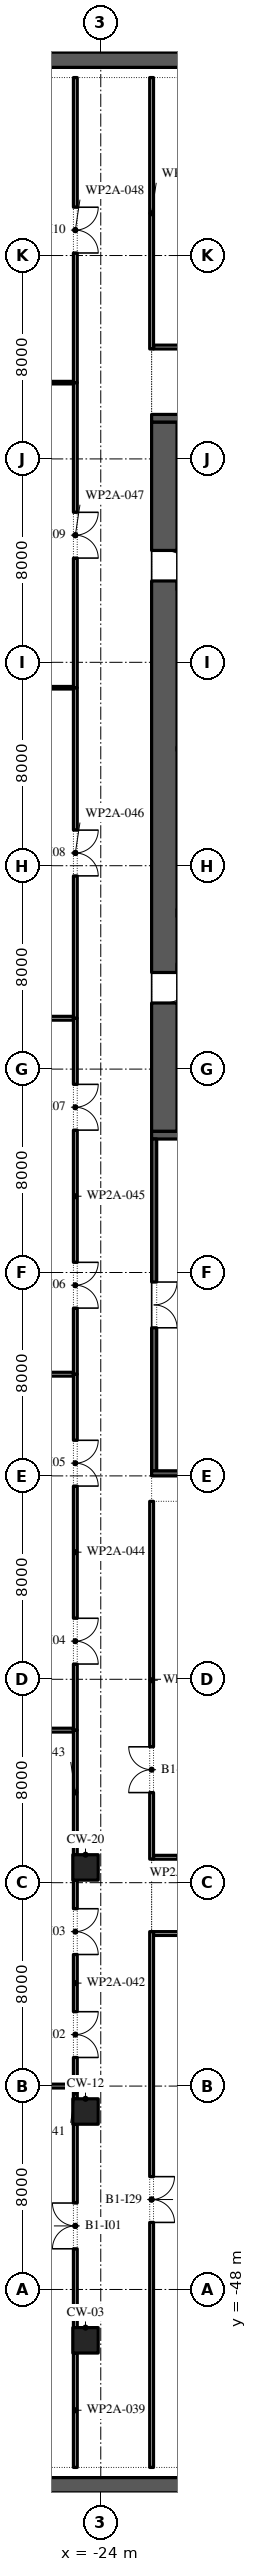
"""IFC4 building model, lengths in metres.
Left out: names, types, materials, properties, quantities, classifications, styles, units other than length and angle.
Written with IfcOpenShell. Run it as: python <this file> out.ifc"""

import sys

from ifc_helpers import new_model, si_unit, direction, frame, frame_2d, origin, origin_2d, place, context, subcontext, project, spatial, rectangle, extrude, element, fill, save


model = new_model("IFC4")
c1 = context("Model", 3, precision=1e-05, world=origin(), true_north=direction((0.0, 1.0)))
c2 = subcontext(c1, "Body", "Model", "MODEL_VIEW")
j1 = project(units=[si_unit("LENGTHUNIT", "METRE"), si_unit("PLANEANGLEUNIT", "RADIAN")], contexts=[c1])
p1 = place(None, origin())
s1 = spatial("IfcSite", under=j1, at=p1, CompositionType="ELEMENT")
p2 = place(p1, origin())
s2 = spatial("IfcBuilding", under=s1, at=p2, CompositionType="ELEMENT")
p3 = place(p2, frame((0.0, 0.0, -5.2)))
s3 = spatial("IfcBuildingStorey", under=s2, at=p3, CompositionType="ELEMENT", Elevation=-5.2)
for number, where, z_axis, x_axis in (
    (1, (-48.0, -55.7, 0.0), (0.0, 0.0, 1.0), (1.0, 0.0, 0.0)),
    (2, (-48.0, 39.7, 0.0), (0.0, 0.0, 1.0), (1.0, 0.0, 0.0)),
):
    element("IfcWall", number, at=place(p3, frame(where, z_axis=z_axis, x_axis=x_axis)), inside=s3, PredefinedType="SOLIDWALL", context=c2, shape_type="SweptSolid", body=[
        extrude(rectangle(XDim=96.0, YDim=0.6, at=frame_2d((48.0, 0.0))), origin(), (0.0, 0.0, 1.0), 4.8),
    ])
for number, where, z_axis, x_axis in (
    (3, (-24.6, -50.0, 0.0), (0.0, 0.0, 1.0), (1.0, 0.0, 0.0)),
    (4, (-24.6, -41.0, 0.0), (0.0, 0.0, 1.0), (1.0, 0.0, 0.0)),
    (5, (-24.6, -31.4, 0.0), (0.0, 0.0, 1.0), (1.0, 0.0, 0.0)),
):
    element("IfcColumn", number, at=place(p3, frame(where, z_axis=z_axis, x_axis=x_axis)), inside=s3, PredefinedType="COLUMN", context=c2, shape_type="SweptSolid", body=[
        extrude(rectangle(XDim=1.0, YDim=1.0, at=origin_2d()), origin(), (0.0, 0.0, 1.0), 5.2),
    ])
p4 = place(p3, frame((-21.5, -2.45, 0.0), z_axis=(0.0, 0.0, 1.0), x_axis=(0.0, 1.0, 0.0)))
e6 = element("IfcWall", 6, at=p4, inside=s3, PredefinedType="SHEAR", context=c2, shape_type="SweptSolid", body=[
    extrude(rectangle(XDim=27.9, YDim=1.0, at=frame_2d((13.95, 0.0))), origin(), (0.0, 0.0, 1.0), 4.9),
])
p5 = place(p4, frame((5.05, 0.0, 0.0)))
e7 = element("IfcOpeningElement", 7, at=p5, cuts=e6, PredefinedType="OPENING", context=c2, shape_type="SweptSolid", body=[
    extrude(rectangle(XDim=1.2, YDim=2.1, at=frame_2d((0.6, 1.05))), frame((0.0, 0.51, 0.0), z_axis=(0.0, -1.0, 0.0), x_axis=(1.0, 0.0, 0.0)), (0.0, 0.0, 1.0), 1.02),
])
p6 = place(p4, frame((21.65, 0.0, 0.0)))
e8 = element("IfcOpeningElement", 8, at=p6, cuts=e6, PredefinedType="OPENING", context=c2, shape_type="SweptSolid", body=[
    extrude(rectangle(XDim=1.2, YDim=2.1, at=frame_2d((0.6, 1.05))), frame((0.0, 0.51, 0.0), z_axis=(0.0, -1.0, 0.0), x_axis=(1.0, 0.0, 0.0)), (0.0, 0.0, 1.0), 1.02),
])
for number, where, z_axis, x_axis in (
    (9, (-22.0, -2.6, 0.0), (0.0, 0.0, 1.0), (1.0, 0.0, 0.0)),
    (10, (-22.0, 25.6, 0.0), (0.0, 0.0, 1.0), (1.0, 0.0, 0.0)),
):
    element("IfcWall", number, at=place(p3, frame(where, z_axis=z_axis, x_axis=x_axis)), inside=s3, PredefinedType="SHEAR", context=c2, shape_type="SweptSolid", body=[
        extrude(rectangle(XDim=12.0, YDim=0.3, at=frame_2d((6.0, 0.0))), origin(), (0.0, 0.0, 1.0), 4.9),
    ])
p7 = place(p3, frame((-21.9, -15.8, 0.0), z_axis=(0.0, 0.0, 1.0), x_axis=(0.0, 1.0, 0.0)))
e11 = element("IfcWall", 11, at=p7, inside=s3, PredefinedType="SHEAR", context=c2, shape_type="SweptSolid", body=[
    extrude(rectangle(XDim=13.05, YDim=0.2, at=frame_2d((6.525, 0.0))), origin(), (0.0, 0.0, 1.0), 4.9),
])
p8 = place(p7, frame((5.625, 0.0, 0.0)))
e12 = element("IfcOpeningElement", 12, at=p8, cuts=e11, PredefinedType="OPENING", context=c2, shape_type="SweptSolid", body=[
    extrude(rectangle(XDim=1.8, YDim=2.4, at=frame_2d((0.9, 1.2))), frame((0.0, 0.11, 0.0), z_axis=(0.0, -1.0, 0.0), x_axis=(1.0, 0.0, 0.0)), (0.0, 0.0, 1.0), 0.22),
])
p9 = place(p3, frame((-22.0, -15.9, 0.0), z_axis=(0.0, 0.0, 1.0), x_axis=(1.0, 0.0, 0.0)))
e13 = element("IfcWall", 13, at=p9, inside=s3, PredefinedType="SHEAR", context=c2, shape_type="SweptSolid", body=[
    extrude(rectangle(XDim=12.0, YDim=0.2, at=frame_2d((6.0, 0.0))), origin(), (0.0, 0.0, 1.0), 4.9),
])
p10 = place(p3, frame((-47.0, -40.0, 0.0), z_axis=(0.0, 0.0, 1.0), x_axis=(1.0, 0.0, 0.0)))
e14 = element("IfcWall", 14, at=p10, inside=s3, PredefinedType="PARTITIONING", context=c2, shape_type="SweptSolid", body=[
    extrude(rectangle(XDim=21.925, YDim=0.15, at=frame_2d((10.962, 0.0))), origin(), (0.0, 0.0, 1.0), 4.9),
])
p11 = place(p3, frame((-21.925, -34.0, 0.0), z_axis=(0.0, 0.0, 1.0), x_axis=(1.0, 0.0, 0.0)))
e15 = element("IfcWall", 15, at=p11, inside=s3, PredefinedType="PARTITIONING", context=c2, shape_type="SweptSolid", body=[
    extrude(rectangle(XDim=10.925, YDim=0.15, at=frame_2d((5.462, 0.0))), origin(), (0.0, 0.0, 1.0), 4.9),
])
p12 = place(p3, frame((-21.925, -31.0, 0.0), z_axis=(0.0, 0.0, 1.0), x_axis=(1.0, 0.0, 0.0)))
e16 = element("IfcWall", 16, at=p12, inside=s3, PredefinedType="PARTITIONING", context=c2, shape_type="SweptSolid", body=[
    extrude(rectangle(XDim=2.025, YDim=0.15, at=frame_2d((1.013, 0.0))), origin(), (0.0, 0.0, 1.0), 4.9),
])
for number, where, z_axis, x_axis in (
    (17, (-47.0, -26.0, 0.0), (0.0, 0.0, 1.0), (1.0, 0.0, 0.0)),
    (18, (-47.0, -12.0, 0.0), (0.0, 0.0, 1.0), (1.0, 0.0, 0.0)),
    (19, (-47.0, 2.0, 0.0), (0.0, 0.0, 1.0), (1.0, 0.0, 0.0)),
):
    element("IfcWall", number, at=place(p3, frame(where, z_axis=z_axis, x_axis=x_axis)), inside=s3, PredefinedType="PARTITIONING", context=c2, shape_type="SweptSolid", body=[
        extrude(rectangle(XDim=21.925, YDim=0.15, at=frame_2d((10.962, 0.0))), origin(), (0.0, 0.0, 1.0), 4.9),
    ])
p13 = place(p3, frame((-41.5, 15.0, 0.0), z_axis=(0.0, 0.0, 1.0), x_axis=(1.0, 0.0, 0.0)))
e20 = element("IfcWall", 20, at=p13, inside=s3, PredefinedType="PARTITIONING", context=c2, shape_type="SweptSolid", body=[
    extrude(rectangle(XDim=16.425, YDim=0.1, at=frame_2d((8.212, 0.0))), origin(), (0.0, 0.0, 1.0), 4.9),
])
p14 = place(p3, frame((-34.0, 27.0, 0.0), z_axis=(0.0, 0.0, 1.0), x_axis=(1.0, 0.0, 0.0)))
e21 = element("IfcWall", 21, at=p14, inside=s3, PredefinedType="PARTITIONING", context=c2, shape_type="SweptSolid", body=[
    extrude(rectangle(XDim=8.925, YDim=0.1, at=frame_2d((4.462, 0.0))), origin(), (0.0, 0.0, 1.0), 4.9),
])
p15 = place(p3, frame((-21.925, 28.4, 0.0), z_axis=(0.0, 0.0, 1.0), x_axis=(1.0, 0.0, 0.0)))
e22 = element("IfcWall", 22, at=p15, inside=s3, PredefinedType="PARTITIONING", context=c2, shape_type="SweptSolid", body=[
    extrude(rectangle(XDim=21.925, YDim=0.15, at=frame_2d((10.962, 0.0))), origin(), (0.0, 0.0, 1.0), 4.9),
])
p16 = place(p15, frame((10.062, 0.0, 0.0)))
e23 = element("IfcOpeningElement", 23, at=p16, cuts=e22, PredefinedType="OPENING", context=c2, shape_type="SweptSolid", body=[
    extrude(rectangle(XDim=1.8, YDim=2.1, at=frame_2d((0.9, 1.05))), frame((0.0, 0.085, 0.0), z_axis=(0.0, -1.0, 0.0), x_axis=(1.0, 0.0, 0.0)), (0.0, 0.0, 1.0), 0.17),
])
p17 = place(p3, frame((-25.0, -55.0, 0.0), z_axis=(0.0, 0.0, 1.0), x_axis=(0.0, 1.0, 0.0)))
e24 = element("IfcWall", 24, at=p17, inside=s3, PredefinedType="PARTITIONING", context=c2, shape_type="SweptSolid", body=[
    extrude(rectangle(XDim=4.5, YDim=0.15, at=frame_2d((2.25, 0.0))), origin(), (0.0, 0.0, 1.0), 4.9),
])
p18 = place(p3, frame((-25.0, -49.5, 0.0), z_axis=(0.0, 0.0, 1.0), x_axis=(0.0, 1.0, 0.0)))
e25 = element("IfcWall", 25, at=p18, inside=s3, PredefinedType="PARTITIONING", context=c2, shape_type="SweptSolid", body=[
    extrude(rectangle(XDim=8.0, YDim=0.15, at=frame_2d((4.0, 0.0))), origin(), (0.0, 0.0, 1.0), 4.9),
])
p19 = place(p18, frame((3.1, 0.0, 0.0)))
e26 = element("IfcOpeningElement", 26, at=p19, cuts=e25, PredefinedType="OPENING", context=c2, shape_type="SweptSolid", body=[
    extrude(rectangle(XDim=1.8, YDim=2.1, at=frame_2d((0.9, 1.05))), frame((0.0, 0.085, 0.0), z_axis=(0.0, -1.0, 0.0), x_axis=(1.0, 0.0, 0.0)), (0.0, 0.0, 1.0), 0.17),
])
p20 = place(p3, frame((-25.0, -40.5, 0.0), z_axis=(0.0, 0.0, 1.0), x_axis=(0.0, 1.0, 0.0)))
e27 = element("IfcWall", 27, at=p20, inside=s3, PredefinedType="PARTITIONING", context=c2, shape_type="SweptSolid", body=[
    extrude(rectangle(XDim=0.5, YDim=0.15, at=frame_2d((0.25, 0.0))), origin(), (0.0, 0.0, 1.0), 4.9),
])
p21 = place(p3, frame((-25.0, -40.0, 0.0), z_axis=(0.0, 0.0, 1.0), x_axis=(0.0, 1.0, 0.0)))
e28 = element("IfcWall", 28, at=p21, inside=s3, PredefinedType="PARTITIONING", context=c2, shape_type="SweptSolid", body=[
    extrude(rectangle(XDim=8.1, YDim=0.15, at=frame_2d((4.05, 0.0))), origin(), (0.0, 0.0, 1.0), 4.9),
])
p22 = place(p21, frame((1.125, 0.0, 0.0)))
e29 = element("IfcOpeningElement", 29, at=p22, cuts=e28, PredefinedType="OPENING", context=c2, shape_type="SweptSolid", body=[
    extrude(rectangle(XDim=1.8, YDim=2.1, at=frame_2d((0.9, 1.05))), frame((0.0, 0.085, 0.0), z_axis=(0.0, -1.0, 0.0), x_axis=(1.0, 0.0, 0.0)), (0.0, 0.0, 1.0), 0.17),
])
p23 = place(p21, frame((5.175, 0.0, 0.0)))
e30 = element("IfcOpeningElement", 30, at=p23, cuts=e28, PredefinedType="OPENING", context=c2, shape_type="SweptSolid", body=[
    extrude(rectangle(XDim=1.8, YDim=2.1, at=frame_2d((0.9, 1.05))), frame((0.0, 0.085, 0.0), z_axis=(0.0, -1.0, 0.0), x_axis=(1.0, 0.0, 0.0)), (0.0, 0.0, 1.0), 0.17),
])
p24 = place(p3, frame((-25.0, -30.9, 0.0), z_axis=(0.0, 0.0, 1.0), x_axis=(0.0, 1.0, 0.0)))
e31 = element("IfcWall", 31, at=p24, inside=s3, PredefinedType="PARTITIONING", context=c2, shape_type="SweptSolid", body=[
    extrude(rectangle(XDim=4.9, YDim=0.15, at=frame_2d((2.45, 0.0))), origin(), (0.0, 0.0, 1.0), 4.9),
])
p25 = place(p3, frame((-25.0, -26.0, 0.0), z_axis=(0.0, 0.0, 1.0), x_axis=(0.0, 1.0, 0.0)))
e32 = element("IfcWall", 32, at=p25, inside=s3, PredefinedType="PARTITIONING", context=c2, shape_type="SweptSolid", body=[
    extrude(rectangle(XDim=14.0, YDim=0.15, at=frame_2d((7.0, 0.0))), origin(), (0.0, 0.0, 1.0), 4.9),
])
p26 = place(p25, frame((2.6, 0.0, 0.0)))
e33 = element("IfcOpeningElement", 33, at=p26, cuts=e32, PredefinedType="OPENING", context=c2, shape_type="SweptSolid", body=[
    extrude(rectangle(XDim=1.8, YDim=2.1, at=frame_2d((0.9, 1.05))), frame((0.0, 0.085, 0.0), z_axis=(0.0, -1.0, 0.0), x_axis=(1.0, 0.0, 0.0)), (0.0, 0.0, 1.0), 0.17),
])
p27 = place(p25, frame((9.6, 0.0, 0.0)))
e34 = element("IfcOpeningElement", 34, at=p27, cuts=e32, PredefinedType="OPENING", context=c2, shape_type="SweptSolid", body=[
    extrude(rectangle(XDim=1.8, YDim=2.1, at=frame_2d((0.9, 1.05))), frame((0.0, 0.085, 0.0), z_axis=(0.0, -1.0, 0.0), x_axis=(1.0, 0.0, 0.0)), (0.0, 0.0, 1.0), 0.17),
])
p28 = place(p3, frame((-25.0, -12.0, 0.0), z_axis=(0.0, 0.0, 1.0), x_axis=(0.0, 1.0, 0.0)))
e35 = element("IfcWall", 35, at=p28, inside=s3, PredefinedType="PARTITIONING", context=c2, shape_type="SweptSolid", body=[
    extrude(rectangle(XDim=14.0, YDim=0.15, at=frame_2d((7.0, 0.0))), origin(), (0.0, 0.0, 1.0), 4.9),
])
p29 = place(p28, frame((2.6, 0.0, 0.0)))
e36 = element("IfcOpeningElement", 36, at=p29, cuts=e35, PredefinedType="OPENING", context=c2, shape_type="SweptSolid", body=[
    extrude(rectangle(XDim=1.8, YDim=2.1, at=frame_2d((0.9, 1.05))), frame((0.0, 0.085, 0.0), z_axis=(0.0, -1.0, 0.0), x_axis=(1.0, 0.0, 0.0)), (0.0, 0.0, 1.0), 0.17),
])
p30 = place(p28, frame((9.6, 0.0, 0.0)))
e37 = element("IfcOpeningElement", 37, at=p30, cuts=e35, PredefinedType="OPENING", context=c2, shape_type="SweptSolid", body=[
    extrude(rectangle(XDim=1.8, YDim=2.1, at=frame_2d((0.9, 1.05))), frame((0.0, 0.085, 0.0), z_axis=(0.0, -1.0, 0.0), x_axis=(1.0, 0.0, 0.0)), (0.0, 0.0, 1.0), 0.17),
])
p31 = place(p3, frame((-25.0, 2.0, 0.0), z_axis=(0.0, 0.0, 1.0), x_axis=(0.0, 1.0, 0.0)))
e38 = element("IfcWall", 38, at=p31, inside=s3, PredefinedType="PARTITIONING", context=c2, shape_type="SweptSolid", body=[
    extrude(rectangle(XDim=13.0, YDim=0.15, at=frame_2d((6.5, 0.0))), origin(), (0.0, 0.0, 1.0), 4.9),
])
p32 = place(p31, frame((5.6, 0.0, 0.0)))
e39 = element("IfcOpeningElement", 39, at=p32, cuts=e38, PredefinedType="OPENING", context=c2, shape_type="SweptSolid", body=[
    extrude(rectangle(XDim=1.8, YDim=2.1, at=frame_2d((0.9, 1.05))), frame((0.0, 0.085, 0.0), z_axis=(0.0, -1.0, 0.0), x_axis=(1.0, 0.0, 0.0)), (0.0, 0.0, 1.0), 0.17),
])
p33 = place(p3, frame((-25.0, 15.0, 0.0), z_axis=(0.0, 0.0, 1.0), x_axis=(0.0, 1.0, 0.0)))
e40 = element("IfcWall", 40, at=p33, inside=s3, PredefinedType="PARTITIONING", context=c2, shape_type="SweptSolid", body=[
    extrude(rectangle(XDim=12.0, YDim=0.15, at=frame_2d((6.0, 0.0))), origin(), (0.0, 0.0, 1.0), 4.9),
])
p34 = place(p33, frame((5.1, 0.0, 0.0)))
e41 = element("IfcOpeningElement", 41, at=p34, cuts=e40, PredefinedType="OPENING", context=c2, shape_type="SweptSolid", body=[
    extrude(rectangle(XDim=1.8, YDim=2.1, at=frame_2d((0.9, 1.05))), frame((0.0, 0.085, 0.0), z_axis=(0.0, -1.0, 0.0), x_axis=(1.0, 0.0, 0.0)), (0.0, 0.0, 1.0), 0.17),
])
p35 = place(p3, frame((-25.0, 27.0, 0.0), z_axis=(0.0, 0.0, 1.0), x_axis=(0.0, 1.0, 0.0)))
e42 = element("IfcWall", 42, at=p35, inside=s3, PredefinedType="PARTITIONING", context=c2, shape_type="SweptSolid", body=[
    extrude(rectangle(XDim=12.0, YDim=0.15, at=frame_2d((6.0, 0.0))), origin(), (0.0, 0.0, 1.0), 4.9),
])
p36 = place(p35, frame((5.1, 0.0, 0.0)))
e43 = element("IfcOpeningElement", 43, at=p36, cuts=e42, PredefinedType="OPENING", context=c2, shape_type="SweptSolid", body=[
    extrude(rectangle(XDim=1.8, YDim=2.1, at=frame_2d((0.9, 1.05))), frame((0.0, 0.085, 0.0), z_axis=(0.0, -1.0, 0.0), x_axis=(1.0, 0.0, 0.0)), (0.0, 0.0, 1.0), 0.17),
])
p37 = place(p3, frame((-22.0, -55.0, 0.0), z_axis=(0.0, 0.0, 1.0), x_axis=(0.0, 1.0, 0.0)))
e44 = element("IfcWall", 44, at=p37, inside=s3, PredefinedType="PARTITIONING", context=c2, shape_type="SweptSolid", body=[
    extrude(rectangle(XDim=21.075, YDim=0.15, at=frame_2d((10.538, 0.0))), origin(), (0.0, 0.0, 1.0), 4.9),
])
p38 = place(p37, frame((9.637, 0.0, 0.0)))
e45 = element("IfcOpeningElement", 45, at=p38, cuts=e44, PredefinedType="OPENING", context=c2, shape_type="SweptSolid", body=[
    extrude(rectangle(XDim=1.8, YDim=2.1, at=frame_2d((0.9, 1.05))), frame((0.0, 0.085, 0.0), z_axis=(0.0, -1.0, 0.0), x_axis=(1.0, 0.0, 0.0)), (0.0, 0.0, 1.0), 0.17),
])
p39 = place(p3, frame((-22.0, -31.075, 0.0), z_axis=(0.0, 0.0, 1.0), x_axis=(0.0, 1.0, 0.0)))
e46 = element("IfcWall", 46, at=p39, inside=s3, PredefinedType="PARTITIONING", context=c2, shape_type="SweptSolid", body=[
    extrude(rectangle(XDim=14.075, YDim=0.15, at=frame_2d((7.038, 0.0))), origin(), (0.0, 0.0, 1.0), 4.9),
])
p40 = place(p39, frame((2.619, 0.0, 0.0)))
e47 = element("IfcOpeningElement", 47, at=p40, cuts=e46, PredefinedType="OPENING", context=c2, shape_type="SweptSolid", body=[
    extrude(rectangle(XDim=1.8, YDim=2.1, at=frame_2d((0.9, 1.05))), frame((0.0, 0.085, 0.0), z_axis=(0.0, -1.0, 0.0), x_axis=(1.0, 0.0, 0.0)), (0.0, 0.0, 1.0), 0.17),
])
p41 = place(p3, frame((-22.0, 28.325, 0.0), z_axis=(0.0, 0.0, 1.0), x_axis=(0.0, 1.0, 0.0)))
e48 = element("IfcWall", 48, at=p41, inside=s3, PredefinedType="PARTITIONING", context=c2, shape_type="SweptSolid", body=[
    extrude(rectangle(XDim=10.675, YDim=0.15, at=frame_2d((5.337, 0.0))), origin(), (0.0, 0.0, 1.0), 4.9),
])
p42 = place(p5, frame((1.2, 0.0, 0.0), z_axis=(0.0, 0.0, 1.0), x_axis=(-1.0, 0.0, 0.0)))
e49 = element("IfcDoor", 49, at=p42, inside=s3, OperationType="SINGLE_SWING_RIGHT", PredefinedType="DOOR", context=c2, shape_type="SweptSolid", body=[
    extrude(rectangle(XDim=1.2, YDim=2.1, at=frame_2d((0.6, 1.05))), frame((0.0, 0.025, 0.0), z_axis=(0.0, -1.0, 0.0), x_axis=(1.0, 0.0, 0.0)), (0.0, 0.0, 1.0), 0.05),
])
fill(e7, e49)
p43 = place(p6, frame((1.2, 0.0, 0.0), z_axis=(0.0, 0.0, 1.0), x_axis=(-1.0, 0.0, 0.0)))
e50 = element("IfcDoor", 50, at=p43, inside=s3, OperationType="SINGLE_SWING_LEFT", PredefinedType="DOOR", context=c2, shape_type="SweptSolid", body=[
    extrude(rectangle(XDim=1.2, YDim=2.1, at=frame_2d((0.6, 1.05))), frame((0.0, 0.025, 0.0), z_axis=(0.0, -1.0, 0.0), x_axis=(1.0, 0.0, 0.0)), (0.0, 0.0, 1.0), 0.05),
])
fill(e8, e50)
p44 = place(p8, frame((1.8, -0.15, 0.0), z_axis=(0.0, 0.0, 1.0), x_axis=(-1.0, 0.0, 0.0)))
e51 = element("IfcDoor", 51, at=p44, inside=s3, OperationType="DOUBLE_DOOR_SINGLE_SWING", PredefinedType="DOOR", context=c2, shape_type="SweptSolid", body=[
    extrude(rectangle(XDim=1.8, YDim=2.4, at=frame_2d((0.9, 1.2))), frame((0.0, -0.05, 0.0), z_axis=(0.0, -1.0, 0.0), x_axis=(1.0, 0.0, 0.0)), (0.0, 0.0, 1.0), 0.05),
])
fill(e12, e51)
p45 = place(p19, origin())
e52 = element("IfcDoor", 52, at=p45, inside=s3, OperationType="SINGLE_SWING_LEFT", PredefinedType="DOOR", context=c2, shape_type="SweptSolid", body=[
    extrude(rectangle(XDim=1.8, YDim=2.1, at=frame_2d((0.9, 1.05))), frame((0.0, 0.025, 0.0), z_axis=(0.0, -1.0, 0.0), x_axis=(1.0, 0.0, 0.0)), (0.0, 0.0, 1.0), 0.05),
])
fill(e26, e52)
p46 = place(p22, frame((1.8, 0.0, 0.0), z_axis=(0.0, 0.0, 1.0), x_axis=(-1.0, 0.0, 0.0)))
e53 = element("IfcDoor", 53, at=p46, inside=s3, OperationType="SINGLE_SWING_RIGHT", PredefinedType="DOOR", context=c2, shape_type="SweptSolid", body=[
    extrude(rectangle(XDim=1.8, YDim=2.1, at=frame_2d((0.9, 1.05))), frame((0.0, 0.025, 0.0), z_axis=(0.0, -1.0, 0.0), x_axis=(1.0, 0.0, 0.0)), (0.0, 0.0, 1.0), 0.05),
])
fill(e29, e53)
p47 = place(p23, frame((1.8, 0.0, 0.0), z_axis=(0.0, 0.0, 1.0), x_axis=(-1.0, 0.0, 0.0)))
e54 = element("IfcDoor", 54, at=p47, inside=s3, OperationType="SINGLE_SWING_RIGHT", PredefinedType="DOOR", context=c2, shape_type="SweptSolid", body=[
    extrude(rectangle(XDim=1.8, YDim=2.1, at=frame_2d((0.9, 1.05))), frame((0.0, 0.025, 0.0), z_axis=(0.0, -1.0, 0.0), x_axis=(1.0, 0.0, 0.0)), (0.0, 0.0, 1.0), 0.05),
])
fill(e30, e54)
p48 = place(p26, frame((1.8, 0.0, 0.0), z_axis=(0.0, 0.0, 1.0), x_axis=(-1.0, 0.0, 0.0)))
e55 = element("IfcDoor", 55, at=p48, inside=s3, OperationType="SINGLE_SWING_LEFT", PredefinedType="DOOR", context=c2, shape_type="SweptSolid", body=[
    extrude(rectangle(XDim=1.8, YDim=2.1, at=frame_2d((0.9, 1.05))), frame((0.0, 0.025, 0.0), z_axis=(0.0, -1.0, 0.0), x_axis=(1.0, 0.0, 0.0)), (0.0, 0.0, 1.0), 0.05),
])
fill(e33, e55)
p49 = place(p27, frame((1.8, 0.0, 0.0), z_axis=(0.0, 0.0, 1.0), x_axis=(-1.0, 0.0, 0.0)))
e56 = element("IfcDoor", 56, at=p49, inside=s3, OperationType="SINGLE_SWING_LEFT", PredefinedType="DOOR", context=c2, shape_type="SweptSolid", body=[
    extrude(rectangle(XDim=1.8, YDim=2.1, at=frame_2d((0.9, 1.05))), frame((0.0, 0.025, 0.0), z_axis=(0.0, -1.0, 0.0), x_axis=(1.0, 0.0, 0.0)), (0.0, 0.0, 1.0), 0.05),
])
fill(e34, e56)
p50 = place(p29, frame((1.8, 0.0, 0.0), z_axis=(0.0, 0.0, 1.0), x_axis=(-1.0, 0.0, 0.0)))
e57 = element("IfcDoor", 57, at=p50, inside=s3, OperationType="SINGLE_SWING_LEFT", PredefinedType="DOOR", context=c2, shape_type="SweptSolid", body=[
    extrude(rectangle(XDim=1.8, YDim=2.1, at=frame_2d((0.9, 1.05))), frame((0.0, 0.025, 0.0), z_axis=(0.0, -1.0, 0.0), x_axis=(1.0, 0.0, 0.0)), (0.0, 0.0, 1.0), 0.05),
])
fill(e36, e57)
p51 = place(p30, frame((1.8, 0.0, 0.0), z_axis=(0.0, 0.0, 1.0), x_axis=(-1.0, 0.0, 0.0)))
e58 = element("IfcDoor", 58, at=p51, inside=s3, OperationType="SINGLE_SWING_LEFT", PredefinedType="DOOR", context=c2, shape_type="SweptSolid", body=[
    extrude(rectangle(XDim=1.8, YDim=2.1, at=frame_2d((0.9, 1.05))), frame((0.0, 0.025, 0.0), z_axis=(0.0, -1.0, 0.0), x_axis=(1.0, 0.0, 0.0)), (0.0, 0.0, 1.0), 0.05),
])
fill(e37, e58)
p52 = place(p32, frame((1.8, 0.0, 0.0), z_axis=(0.0, 0.0, 1.0), x_axis=(-1.0, 0.0, 0.0)))
e59 = element("IfcDoor", 59, at=p52, inside=s3, OperationType="SINGLE_SWING_RIGHT", PredefinedType="DOOR", context=c2, shape_type="SweptSolid", body=[
    extrude(rectangle(XDim=1.8, YDim=2.1, at=frame_2d((0.9, 1.05))), frame((0.0, 0.025, 0.0), z_axis=(0.0, -1.0, 0.0), x_axis=(1.0, 0.0, 0.0)), (0.0, 0.0, 1.0), 0.05),
])
fill(e39, e59)
p53 = place(p34, frame((1.8, 0.0, 0.0), z_axis=(0.0, 0.0, 1.0), x_axis=(-1.0, 0.0, 0.0)))
e60 = element("IfcDoor", 60, at=p53, inside=s3, OperationType="SINGLE_SWING_RIGHT", PredefinedType="DOOR", context=c2, shape_type="SweptSolid", body=[
    extrude(rectangle(XDim=1.8, YDim=2.1, at=frame_2d((0.9, 1.05))), frame((0.0, 0.025, 0.0), z_axis=(0.0, -1.0, 0.0), x_axis=(1.0, 0.0, 0.0)), (0.0, 0.0, 1.0), 0.05),
])
fill(e41, e60)
p54 = place(p36, frame((1.8, 0.0, 0.0), z_axis=(0.0, 0.0, 1.0), x_axis=(-1.0, 0.0, 0.0)))
e61 = element("IfcDoor", 61, at=p54, inside=s3, OperationType="SINGLE_SWING_LEFT", PredefinedType="DOOR", context=c2, shape_type="SweptSolid", body=[
    extrude(rectangle(XDim=1.8, YDim=2.1, at=frame_2d((0.9, 1.05))), frame((0.0, 0.025, 0.0), z_axis=(0.0, -1.0, 0.0), x_axis=(1.0, 0.0, 0.0)), (0.0, 0.0, 1.0), 0.05),
])
fill(e43, e61)
p55 = place(p40, origin())
e62 = element("IfcDoor", 62, at=p55, inside=s3, OperationType="SINGLE_SWING_RIGHT", PredefinedType="DOOR", context=c2, shape_type="SweptSolid", body=[
    extrude(rectangle(XDim=1.8, YDim=2.1, at=frame_2d((0.9, 1.05))), frame((0.0, 0.025, 0.0), z_axis=(0.0, -1.0, 0.0), x_axis=(1.0, 0.0, 0.0)), (0.0, 0.0, 1.0), 0.05),
])
fill(e47, e62)
p56 = place(p38, frame((1.8, 0.0, 0.0), z_axis=(0.0, 0.0, 1.0), x_axis=(-1.0, 0.0, 0.0)))
e63 = element("IfcDoor", 63, at=p56, inside=s3, OperationType="SINGLE_SWING_RIGHT", PredefinedType="DOOR", context=c2, shape_type="SweptSolid", body=[
    extrude(rectangle(XDim=1.8, YDim=2.1, at=frame_2d((0.9, 1.05))), frame((0.0, 0.025, 0.0), z_axis=(0.0, -1.0, 0.0), x_axis=(1.0, 0.0, 0.0)), (0.0, 0.0, 1.0), 0.05),
])
fill(e45, e63)
save(model, sys.argv[1])
